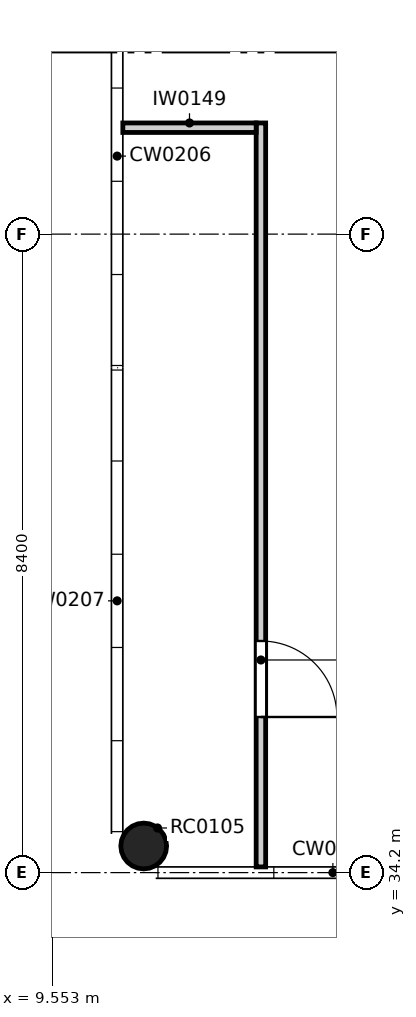
"""IFC4 building model, lengths in metres.
Left out: names, types, materials, properties, quantities, classifications, styles, units other than length and angle.
Written with IfcOpenShell. Run it as: python <this file> out.ifc"""

import sys

from ifc_helpers import new_model, si_unit, direction, frame, frame_2d, origin, origin_2d, place, context, subcontext, project, spatial, rectangle, circle, extrude, element, fill, save


model = new_model("IFC4")
c1 = context("Model", 3, precision=1e-05, world=origin(), true_north=direction((0.0, 1.0)))
c2 = subcontext(c1, "Body", "Model", "MODEL_VIEW")
j1 = project(units=[si_unit("LENGTHUNIT", "METRE"), si_unit("PLANEANGLEUNIT", "RADIAN")], contexts=[c1])
p1 = place(None, origin())
s1 = spatial("IfcSite", under=j1, at=p1, CompositionType="ELEMENT")
p2 = place(p1, origin())
s2 = spatial("IfcBuilding", under=s1, at=p2, CompositionType="ELEMENT")
p3 = place(p2, frame((0.0, 0.0, 4.8)))
s3 = spatial("IfcBuildingStorey", under=s2, at=p3, CompositionType="ELEMENT", Elevation=4.8)
p4 = place(p3, frame((10.758, 34.55, 0.0), z_axis=(0.0, 0.0, 1.0), x_axis=(1.0, 0.0, 0.0)))
e1 = element("IfcColumn", 1, at=p4, inside=s3, PredefinedType="COLUMN", context=c2, shape_type="SweptSolid", body=[
    extrude(circle(Radius=0.3, at=origin_2d()), origin(), (0.0, 0.0, 1.0), 4.8),
])
p5 = place(p3, frame((12.3, 44.062, 0.0), z_axis=(0.0, 0.0, 1.0), x_axis=(0.0, -1.0, 0.0)))
e2 = element("IfcWall", 2, at=p5, inside=s3, PredefinedType="PARTITIONING", context=c2, shape_type="SweptSolid", body=[
    extrude(rectangle(XDim=9.788, YDim=0.125, at=frame_2d((4.894, 0.0))), origin(), (0.0, 0.0, 1.0), 3.75),
])
p6 = place(p5, frame((6.815, 0.0, 0.0)))
e3 = element("IfcOpeningElement", 3, at=p6, cuts=e2, PredefinedType="OPENING", context=c2, shape_type="SweptSolid", body=[
    extrude(rectangle(XDim=1.0, YDim=2.1, at=frame_2d((0.5, 1.05))), frame((0.0, 0.073, 0.0), z_axis=(0.0, -1.0, 0.0), x_axis=(1.0, 0.0, 0.0)), (0.0, 0.0, 1.0), 0.145),
])
p7 = place(p3, frame((10.483, 44.0, 0.0), z_axis=(0.0, 0.0, 1.0), x_axis=(1.0, 0.0, 0.0)))
e4 = element("IfcWall", 4, at=p7, inside=s3, PredefinedType="PARTITIONING", context=c2, shape_type="SweptSolid", body=[
    extrude(rectangle(XDim=1.754, YDim=0.125, at=frame_2d((0.877, 0.0))), origin(), (0.0, 0.0, 1.0), 3.75),
])
p8 = place(p6, origin())
e5 = element("IfcDoor", 5, at=p8, inside=s3, OperationType="SINGLE_SWING_RIGHT", PredefinedType="DOOR", context=c2, shape_type="SweptSolid", body=[
    extrude(rectangle(XDim=1.0, YDim=2.1, at=frame_2d((0.5, 1.05))), frame((0.0, 0.025, 0.0), z_axis=(0.0, -1.0, 0.0), x_axis=(1.0, 0.0, 0.0)), (0.0, 0.0, 1.0), 0.05),
])
fill(e3, e5)
save(model, sys.argv[1])
